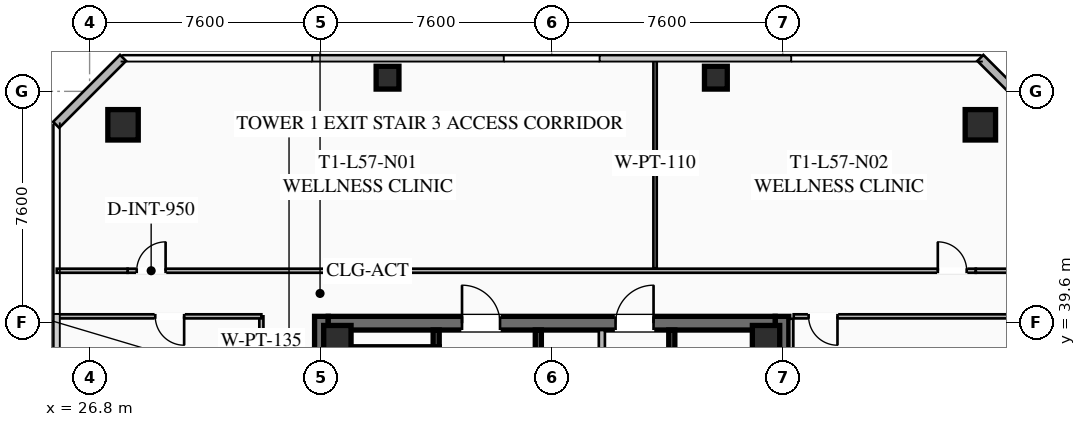
"""IFC4 building model, lengths in metres.
Left out: names, types, materials, properties, quantities, classifications, styles, units other than length and angle.
Written with IfcOpenShell. Run it as: python <this file> out.ifc"""

import sys

from ifc_helpers import new_model, si_unit, direction, frame, frame_2d, origin, origin_2d, place, context, subcontext, project, spatial, rectangle, hollow_rectangle, extrude, element, fill, save


model = new_model("IFC4")
c1 = context("Model", 3, precision=1e-05, world=origin(), true_north=direction((0.0, 1.0)))
c2 = subcontext(c1, "Body", "Model", "MODEL_VIEW")
j1 = project(units=[si_unit("LENGTHUNIT", "METRE"), si_unit("PLANEANGLEUNIT", "RADIAN")], contexts=[c1])
p1 = place(None, origin())
s1 = spatial("IfcSite", under=j1, at=p1, CompositionType="ELEMENT")
p2 = place(p1, origin())
s2 = spatial("IfcBuilding", under=s1, at=p2, CompositionType="ELEMENT")
p3 = place(p2, frame((0.0, 0.0, 211.3)))
s3 = spatial("IfcBuildingStorey", under=s2, at=p3, CompositionType="ELEMENT", Elevation=211.3)
for number, where, z_axis, x_axis in (
    (1, (34.425, 24.2, 0.0), (0.0, 0.0, 1.0), (0.0, 1.0, 0.0)),
    (2, (49.575, 39.8, 0.0), (0.0, 0.0, 1.0), (0.0, -1.0, 0.0)),
):
    element("IfcWall", number, at=place(p3, frame(where, z_axis=z_axis, x_axis=x_axis)), inside=s3, PredefinedType="SHEAR", context=c2, shape_type="SweptSolid", body=[
        extrude(rectangle(XDim=15.6, YDim=0.45, at=frame_2d((7.8, 0.0))), origin(), (0.0, 0.0, 1.0), 3.55),
    ])
p4 = place(p3, frame((34.65, 39.575, 0.0), z_axis=(0.0, 0.0, 1.0), x_axis=(1.0, 0.0, 0.0)))
e3 = element("IfcWall", 3, at=p4, inside=s3, PredefinedType="SHEAR", context=c2, shape_type="SweptSolid", body=[
    extrude(rectangle(XDim=14.7, YDim=0.45, at=frame_2d((7.35, 0.0))), origin(), (0.0, 0.0, 1.0), 3.55),
])
p5 = place(p4, frame((4.4, 0.0, 0.0)))
e4 = element("IfcOpeningElement", 4, at=p5, cuts=e3, PredefinedType="OPENING", context=c2, shape_type="SweptSolid", body=[
    extrude(rectangle(XDim=1.25, YDim=2.25, at=frame_2d((0.625, 1.125))), frame((0.0, 0.235, 0.0), z_axis=(0.0, -1.0, 0.0), x_axis=(1.0, 0.0, 0.0)), (0.0, 0.0, 1.0), 0.47),
])
p6 = place(p4, frame((9.45, 0.0, 0.0)))
e5 = element("IfcOpeningElement", 5, at=p6, cuts=e3, PredefinedType="OPENING", context=c2, shape_type="SweptSolid", body=[
    extrude(rectangle(XDim=1.25, YDim=2.25, at=frame_2d((0.625, 1.125))), frame((0.0, 0.235, 0.0), z_axis=(0.0, -1.0, 0.0), x_axis=(1.0, 0.0, 0.0)), (0.0, 0.0, 1.0), 0.47),
])
for number, where, z_axis, x_axis in (
    (6, (49.05, 39.05, 0.0), (0.0, 0.0, 1.0), (1.0, 0.0, 0.0)),
    (7, (34.95, 39.05, 0.0), (0.0, 0.0, 1.0), (1.0, 0.0, 0.0)),
):
    element("IfcColumn", number, at=place(p3, frame(where, z_axis=z_axis, x_axis=x_axis)), inside=s3, PredefinedType="COLUMN", context=c2, shape_type="SweptSolid", body=[
        extrude(hollow_rectangle(XDim=0.9, YDim=0.9, WallThickness=0.04, at=origin_2d()), origin(), (0.0, 0.0, 1.0), 3.37),
    ])
for number, where, z_axis, x_axis in (
    (8, (56.1, 46.1, 0.0), (0.0, 0.0, 1.0), (1.0, 0.0, 0.0)),
    (9, (27.9, 46.1, 0.0), (0.0, 0.0, 1.0), (1.0, 0.0, 0.0)),
):
    element("IfcColumn", number, at=place(p3, frame(where, z_axis=z_axis, x_axis=x_axis)), inside=s3, PredefinedType="COLUMN", context=c2, shape_type="SweptSolid", body=[
        extrude(hollow_rectangle(XDim=1.0, YDim=1.0, WallThickness=0.04, at=origin_2d()), origin(), (0.0, 0.0, 1.0), 3.37),
    ])
for number, where, z_axis, x_axis in (
    (10, (47.4, 47.65, 0.0), (0.0, 0.0, 1.0), (1.0, 0.0, 0.0)),
    (11, (36.6, 47.65, 0.0), (0.0, 0.0, 1.0), (1.0, 0.0, 0.0)),
):
    element("IfcColumn", number, at=place(p3, frame(where, z_axis=z_axis, x_axis=x_axis)), inside=s3, PredefinedType="COLUMN", context=c2, shape_type="SweptSolid", body=[
        extrude(hollow_rectangle(XDim=0.75, YDim=0.75, WallThickness=0.032, at=origin_2d()), origin(), (0.0, 0.0, 1.0), 3.37),
    ])
for number, where, z_axis, x_axis in (
    (12, (25.7, 46.1, 0.0), (0.0, 0.0, 1.0), (0.707, 0.707, 0.0)),
    (13, (56.1, 48.3, 0.0), (0.0, 0.0, 1.0), (0.707, -0.707, 0.0)),
):
    element("IfcWall", number, at=place(p3, frame(where, z_axis=z_axis, x_axis=x_axis)), inside=s3, PredefinedType="SOLIDWALL", context=c2, shape_type="SweptSolid", body=[
        extrude(rectangle(XDim=3.111, YDim=0.28, at=frame_2d((1.556, 0.0))), origin(), (0.0, 0.0, 1.0), 3.37),
    ])
p7 = place(p3, frame((38.2, 31.2, 0.0), z_axis=(0.0, 0.0, 1.0), x_axis=(0.0, 1.0, 0.0)))
e14 = element("IfcWall", 14, at=p7, inside=s3, PredefinedType="SHEAR", context=c2, shape_type="SweptSolid", body=[
    extrude(rectangle(XDim=8.15, YDim=0.2, at=frame_2d((4.075, 0.0))), origin(), (0.0, 0.0, 1.0), 3.37),
])
p8 = place(p7, frame((0.45, 0.0, 0.0)))
e15 = element("IfcOpeningElement", 15, at=p8, cuts=e14, PredefinedType="OPENING", context=c2, shape_type="SweptSolid", body=[
    extrude(rectangle(XDim=1.15, YDim=2.2, at=frame_2d((0.575, 1.1))), frame((0.0, 0.11, 0.0), z_axis=(0.0, -1.0, 0.0), x_axis=(1.0, 0.0, 0.0)), (0.0, 0.0, 1.0), 0.22),
])
p9 = place(p3, frame((41.56, 24.65, 0.0), z_axis=(0.0, 0.0, 1.0), x_axis=(0.0, 1.0, 0.0)))
e16 = element("IfcWall", 16, at=p9, inside=s3, PredefinedType="SHEAR", context=c2, shape_type="SweptSolid", body=[
    extrude(rectangle(XDim=14.7, YDim=0.2, at=frame_2d((7.35, 0.0))), origin(), (0.0, 0.0, 1.0), 3.37),
])
p10 = place(p3, frame((45.95, 39.35, 0.0), z_axis=(0.0, 0.0, 1.0), x_axis=(0.0, -1.0, 0.0)))
e17 = element("IfcWall", 17, at=p10, inside=s3, PredefinedType="SHEAR", context=c2, shape_type="SweptSolid", body=[
    extrude(rectangle(XDim=6.55, YDim=0.2, at=frame_2d((3.275, 0.0))), origin(), (0.0, 0.0, 1.0), 3.37),
])
p11 = place(p10, frame((5.075, 0.0, 0.0)))
e18 = element("IfcOpeningElement", 18, at=p11, cuts=e17, PredefinedType="OPENING", context=c2, shape_type="SweptSolid", body=[
    extrude(rectangle(XDim=1.1, YDim=2.2, at=frame_2d((0.55, 1.1))), frame((0.0, 0.11, 0.0), z_axis=(0.0, -1.0, 0.0), x_axis=(1.0, 0.0, 0.0)), (0.0, 0.0, 1.0), 0.22),
])
p12 = place(p10, frame((3.025, 0.0, 0.0)))
e19 = element("IfcOpeningElement", 19, at=p12, cuts=e17, PredefinedType="OPENING", context=c2, shape_type="SweptSolid", body=[
    extrude(rectangle(XDim=1.1, YDim=2.2, at=frame_2d((0.55, 1.1))), frame((0.0, 0.11, 0.0), z_axis=(0.0, -1.0, 0.0), x_axis=(1.0, 0.0, 0.0)), (0.0, 0.0, 1.0), 0.22),
])
p13 = place(p10, frame((1.025, 0.0, 0.0)))
e20 = element("IfcOpeningElement", 20, at=p13, cuts=e17, PredefinedType="OPENING", context=c2, shape_type="SweptSolid", body=[
    extrude(rectangle(XDim=1.1, YDim=2.2, at=frame_2d((0.55, 1.1))), frame((0.0, 0.11, 0.0), z_axis=(0.0, -1.0, 0.0), x_axis=(1.0, 0.0, 0.0)), (0.0, 0.0, 1.0), 0.22),
])
p14 = place(p3, frame((43.65, 32.35, 0.0), z_axis=(0.0, 0.0, 1.0), x_axis=(0.0, 1.0, 0.0)))
e21 = element("IfcWall", 21, at=p14, inside=s3, PredefinedType="SOLIDWALL", context=c2, shape_type="SweptSolid", body=[
    extrude(rectangle(XDim=7.0, YDim=0.2, at=frame_2d((3.5, 0.0))), origin(), (0.0, 0.0, 1.0), 2.723),
])
p15 = place(p14, frame((0.85, 0.0, 0.0)))
e22 = element("IfcOpeningElement", 22, at=p15, cuts=e21, PredefinedType="OPENING", context=c2, shape_type="SweptSolid", body=[
    extrude(rectangle(XDim=0.95, YDim=2.05, at=frame_2d((0.475, 1.025))), frame((0.0, 0.11, 0.0), z_axis=(0.0, -1.0, 0.0), x_axis=(1.0, 0.0, 0.0)), (0.0, 0.0, 1.0), 0.22),
])
p16 = place(p14, frame((4.85, 0.0, 0.0)))
e23 = element("IfcOpeningElement", 23, at=p16, cuts=e21, PredefinedType="OPENING", context=c2, shape_type="SweptSolid", body=[
    extrude(rectangle(XDim=0.95, YDim=2.05, at=frame_2d((0.475, 1.025))), frame((0.0, 0.11, 0.0), z_axis=(0.0, -1.0, 0.0), x_axis=(1.0, 0.0, 0.0)), (0.0, 0.0, 1.0), 0.22),
])
p17 = place(p3, frame((32.45, 35.4, 0.0), z_axis=(0.0, 0.0, 1.0), x_axis=(0.0, 1.0, 0.0)))
e24 = element("IfcWall", 24, at=p17, inside=s3, PredefinedType="PARTITIONING", context=c2, shape_type="SweptSolid", body=[
    extrude(rectangle(XDim=4.4, YDim=0.135, at=frame_2d((2.2, 0.0))), origin(), (0.0, 0.0, 1.0), 2.723),
])
p18 = place(p3, frame((28.05, 41.3, 0.0), z_axis=(0.0, 0.0, 1.0), x_axis=(1.0, 0.0, 0.0)))
e25 = element("IfcWall", 25, at=p18, inside=s3, PredefinedType="PARTITIONING", context=c2, shape_type="SweptSolid", body=[
    extrude(rectangle(XDim=27.9, YDim=0.135, at=frame_2d((13.95, 0.0))), origin(), (0.0, 0.0, 1.0), 2.723),
])
p19 = place(p18, frame((0.3, 0.0, 0.0)))
e26 = element("IfcOpeningElement", 26, at=p19, cuts=e25, PredefinedType="OPENING", context=c2, shape_type="SweptSolid", body=[
    extrude(rectangle(XDim=0.95, YDim=2.05, at=frame_2d((0.475, 1.025))), frame((0.0, 0.077, 0.0), z_axis=(0.0, -1.0, 0.0), x_axis=(1.0, 0.0, 0.0)), (0.0, 0.0, 1.0), 0.155),
])
p20 = place(p18, frame((26.65, 0.0, 0.0)))
e27 = element("IfcOpeningElement", 27, at=p20, cuts=e25, PredefinedType="OPENING", context=c2, shape_type="SweptSolid", body=[
    extrude(rectangle(XDim=0.95, YDim=2.05, at=frame_2d((0.475, 1.025))), frame((0.0, 0.077, 0.0), z_axis=(0.0, -1.0, 0.0), x_axis=(1.0, 0.0, 0.0)), (0.0, 0.0, 1.0), 0.155),
])
for number, where, z_axis, x_axis in (
    (28, (25.72, 41.3, 0.0), (0.0, 0.0, 1.0), (1.0, 0.0, 0.0)),
    (29, (55.95, 41.3, 0.0), (0.0, 0.0, 1.0), (1.0, 0.0, 0.0)),
):
    element("IfcWall", number, at=place(p3, frame(where, z_axis=z_axis, x_axis=x_axis)), inside=s3, PredefinedType="PARTITIONING", context=c2, shape_type="SweptSolid", body=[
        extrude(rectangle(XDim=2.33, YDim=0.135, at=frame_2d((1.165, 0.0))), origin(), (0.0, 0.0, 1.0), 2.723),
    ])
p21 = place(p3, frame((45.4, 41.38, 0.0), z_axis=(0.0, 0.0, 1.0), x_axis=(0.0, 1.0, 0.0)))
e30 = element("IfcWall", 30, at=p21, inside=s3, PredefinedType="PARTITIONING", context=c2, shape_type="SweptSolid", body=[
    extrude(rectangle(XDim=6.9, YDim=0.11, at=frame_2d((3.45, 0.0))), origin(), (0.0, 0.0, 1.0), 2.723),
])
p22 = place(p3, frame((49.88, 39.72, 0.0), z_axis=(0.0, 0.0, 1.0), x_axis=(0.0, -1.0, 0.0)))
e31 = element("IfcWall", 31, at=p22, inside=s3, PredefinedType="PARTITIONING", context=c2, shape_type="SweptSolid", body=[
    extrude(rectangle(XDim=15.44, YDim=0.135, at=frame_2d((7.72, 0.0))), origin(), (0.0, 0.0, 1.0), 2.723),
])
p23 = place(p3, frame((58.28, 39.8, 0.0), z_axis=(0.0, 0.0, 1.0), x_axis=(-1.0, 0.0, 0.0)))
e32 = element("IfcWall", 32, at=p23, inside=s3, PredefinedType="PARTITIONING", context=c2, shape_type="SweptSolid", body=[
    extrude(rectangle(XDim=8.32, YDim=0.135, at=frame_2d((4.16, 0.0))), origin(), (0.0, 0.0, 1.0), 2.723),
])
p24 = place(p23, frame((6.88, 0.0, 0.0)))
e33 = element("IfcOpeningElement", 33, at=p24, cuts=e32, PredefinedType="OPENING", context=c2, shape_type="SweptSolid", body=[
    extrude(rectangle(XDim=0.95, YDim=2.05, at=frame_2d((0.475, 1.025))), frame((0.0, 0.077, 0.0), z_axis=(0.0, -1.0, 0.0), x_axis=(1.0, 0.0, 0.0)), (0.0, 0.0, 1.0), 0.155),
])
p25 = place(p3, frame((32.45, 39.8, 0.0), z_axis=(0.0, 0.0, 1.0), x_axis=(-1.0, 0.0, 0.0)))
e34 = element("IfcWall", 34, at=p25, inside=s3, PredefinedType="PARTITIONING", context=c2, shape_type="SweptSolid", body=[
    extrude(rectangle(XDim=6.73, YDim=0.135, at=frame_2d((3.365, 0.0))), origin(), (0.0, 0.0, 1.0), 2.723),
])
p26 = place(p25, frame((2.54, 0.0, 0.0)))
e35 = element("IfcOpeningElement", 35, at=p26, cuts=e34, PredefinedType="OPENING", context=c2, shape_type="SweptSolid", body=[
    extrude(rectangle(XDim=0.95, YDim=2.05, at=frame_2d((0.475, 1.025))), frame((0.0, 0.077, 0.0), z_axis=(0.0, -1.0, 0.0), x_axis=(1.0, 0.0, 0.0)), (0.0, 0.0, 1.0), 0.155),
])
p27 = place(p5, origin())
e36 = element("IfcDoor", 36, at=p27, inside=s3, OperationType="SINGLE_SWING_LEFT", PredefinedType="DOOR", context=c2, shape_type="SweptSolid", body=[
    extrude(rectangle(XDim=1.25, YDim=2.25, at=frame_2d((0.625, 1.125))), frame((0.0, 0.025, 0.0), z_axis=(0.0, -1.0, 0.0), x_axis=(1.0, 0.0, 0.0)), (0.0, 0.0, 1.0), 0.05),
])
fill(e4, e36)
p28 = place(p6, origin())
e37 = element("IfcDoor", 37, at=p28, inside=s3, OperationType="SINGLE_SWING_RIGHT", PredefinedType="DOOR", context=c2, shape_type="SweptSolid", body=[
    extrude(rectangle(XDim=1.25, YDim=2.25, at=frame_2d((0.625, 1.125))), frame((0.0, 0.025, 0.0), z_axis=(0.0, -1.0, 0.0), x_axis=(1.0, 0.0, 0.0)), (0.0, 0.0, 1.0), 0.05),
])
fill(e5, e37)
p29 = place(p19, origin())
e38 = element("IfcDoor", 38, at=p29, inside=s3, OperationType="SINGLE_SWING_RIGHT", PredefinedType="DOOR", context=c2, shape_type="SweptSolid", body=[
    extrude(rectangle(XDim=0.95, YDim=2.05, at=frame_2d((0.475, 1.025))), frame((0.0, 0.025, 0.0), z_axis=(0.0, -1.0, 0.0), x_axis=(1.0, 0.0, 0.0)), (0.0, 0.0, 1.0), 0.05),
])
fill(e26, e38)
p30 = place(p20, origin())
e39 = element("IfcDoor", 39, at=p30, inside=s3, OperationType="SINGLE_SWING_LEFT", PredefinedType="DOOR", context=c2, shape_type="SweptSolid", body=[
    extrude(rectangle(XDim=0.95, YDim=2.05, at=frame_2d((0.475, 1.025))), frame((0.0, 0.025, 0.0), z_axis=(0.0, -1.0, 0.0), x_axis=(1.0, 0.0, 0.0)), (0.0, 0.0, 1.0), 0.05),
])
fill(e27, e39)
p31 = place(p24, origin())
e40 = element("IfcDoor", 40, at=p31, inside=s3, OperationType="SINGLE_SWING_LEFT", PredefinedType="DOOR", context=c2, shape_type="SweptSolid", body=[
    extrude(rectangle(XDim=0.95, YDim=2.05, at=frame_2d((0.475, 1.025))), frame((0.0, 0.025, 0.0), z_axis=(0.0, -1.0, 0.0), x_axis=(1.0, 0.0, 0.0)), (0.0, 0.0, 1.0), 0.05),
])
fill(e33, e40)
p32 = place(p26, origin())
e41 = element("IfcDoor", 41, at=p32, inside=s3, OperationType="SINGLE_SWING_LEFT", PredefinedType="DOOR", context=c2, shape_type="SweptSolid", body=[
    extrude(rectangle(XDim=0.95, YDim=2.05, at=frame_2d((0.475, 1.025))), frame((0.0, 0.025, 0.0), z_axis=(0.0, -1.0, 0.0), x_axis=(1.0, 0.0, 0.0)), (0.0, 0.0, 1.0), 0.05),
])
fill(e35, e41)
save(model, sys.argv[1])
